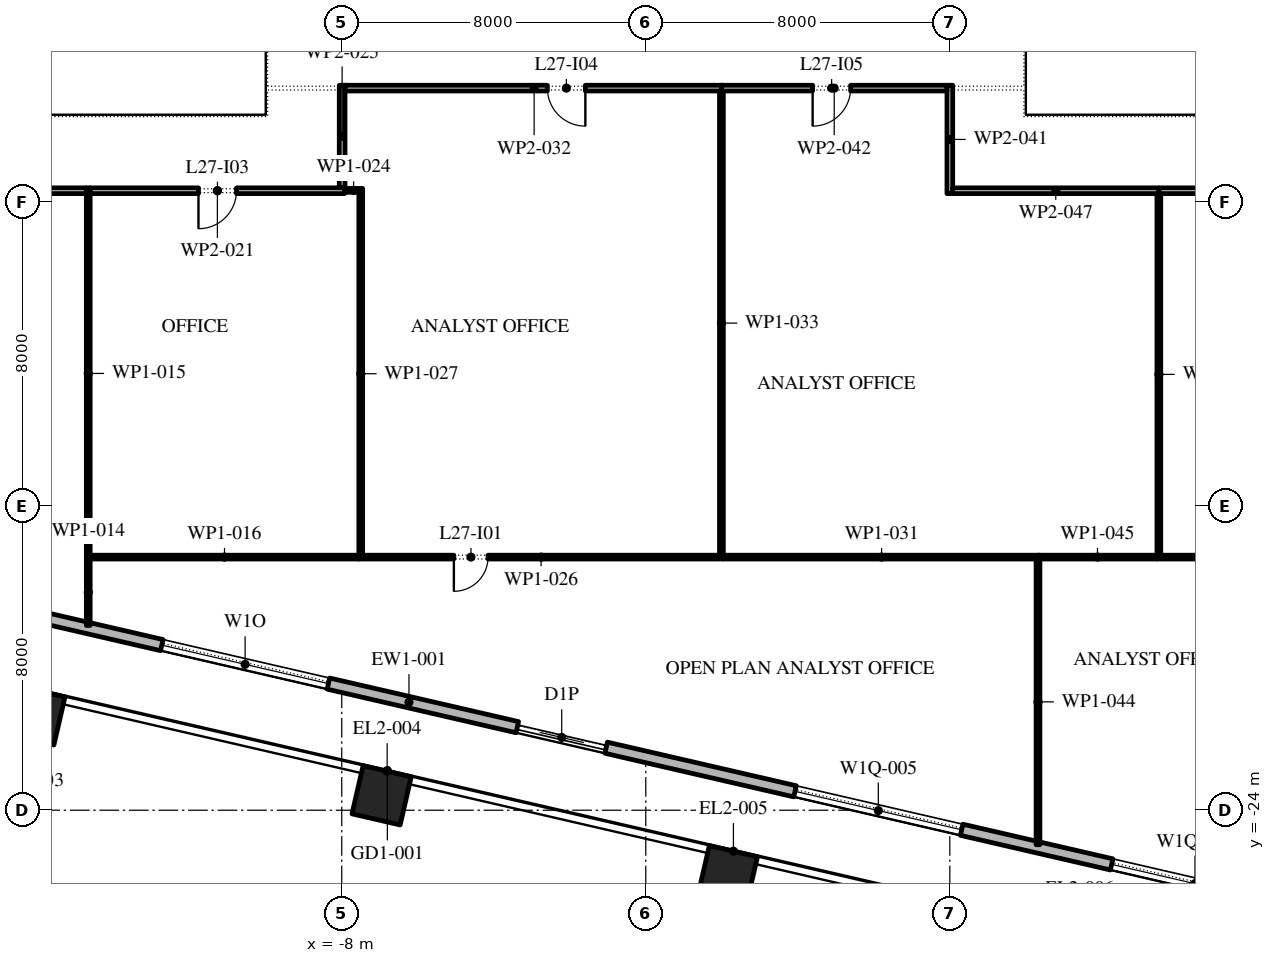
"""IFC4 building model, lengths in metres.
Left out: names, types, materials, properties, quantities, classifications, styles, units other than length and angle.
Written with IfcOpenShell. Run it as: python <this file> out.ifc"""

import sys

from ifc_helpers import new_model, si_unit, direction, frame, frame_2d, origin, origin_2d, place, context, subcontext, project, spatial, rectangle, extrude, element, fill, save


model = new_model("IFC4")
c1 = context("Model", 3, precision=1e-05, world=origin(), true_north=direction((0.0, 1.0)))
c2 = subcontext(c1, "Body", "Model", "MODEL_VIEW")
j1 = project(units=[si_unit("LENGTHUNIT", "METRE"), si_unit("PLANEANGLEUNIT", "RADIAN")], contexts=[c1])
p1 = place(None, origin())
s1 = spatial("IfcSite", under=j1, at=p1, CompositionType="ELEMENT")
p2 = place(p1, origin())
s2 = spatial("IfcBuilding", under=s1, at=p2, CompositionType="ELEMENT")
p3 = place(p2, frame((0.0, 0.0, 126.6)))
s3 = spatial("IfcBuildingStorey", under=s2, at=p3, CompositionType="ELEMENT", Elevation=126.6)
for number, where, z_axis, x_axis in (
    (1, (-16.061, -21.505, 0.0), (0.0, 0.0, 1.0), (0.974, -0.225, 0.0)),
    (2, (-6.951, -23.608, 0.0), (0.0, 0.0, 1.0), (0.974, -0.225, 0.0)),
    (3, (2.159, -25.711, 0.0), (0.0, 0.0, 1.0), (0.974, -0.225, 0.0)),
):
    element("IfcColumn", number, at=place(p3, frame(where, z_axis=z_axis, x_axis=x_axis)), inside=s3, PredefinedType="COLUMN", context=c2, shape_type="SweptSolid", body=[
        extrude(rectangle(XDim=1.3, YDim=1.3, at=origin_2d()), origin(), (0.0, 0.0, 1.0), 4.2),
    ])
p4 = place(p3, frame((-31.078, -15.421, 0.0), z_axis=(0.0, 0.0, 1.0), x_axis=(0.974370456532, -0.224949357493, 0.0)))
e4 = element("IfcWall", 4, at=p4, inside=s3, PredefinedType="STANDARD", context=c2, shape_type="SweptSolid", body=[
    extrude(rectangle(XDim=51.0, YDim=0.3, at=frame_2d((25.5, 0.0))), origin(), (0.0, 0.0, 1.0), 4.0),
])
p5 = place(p4, frame((1.875, 0.0, 0.45)))
e5 = element("IfcOpeningElement", 5, at=p5, cuts=e4, PredefinedType="OPENING", context=c2, shape_type="SweptSolid", body=[
    extrude(rectangle(XDim=4.5, YDim=2.65, at=frame_2d((2.25, 1.325))), frame((0.0, 0.16, 0.0), z_axis=(0.0, -1.0, 0.0), x_axis=(1.0, 0.0, 0.0)), (0.0, 0.0, 1.0), 0.32),
])
p6 = place(p4, frame((10.275, 0.0, 0.45)))
e6 = element("IfcOpeningElement", 6, at=p6, cuts=e4, PredefinedType="OPENING", context=c2, shape_type="SweptSolid", body=[
    extrude(rectangle(XDim=4.5, YDim=2.525, at=frame_2d((2.25, 1.262))), frame((0.0, 0.16, 0.0), z_axis=(0.0, -1.0, 0.0), x_axis=(1.0, 0.0, 0.0)), (0.0, 0.0, 1.0), 0.32),
])
p7 = place(p4, frame((18.825, 0.0, 0.45)))
e7 = element("IfcOpeningElement", 7, at=p7, cuts=e4, PredefinedType="OPENING", context=c2, shape_type="SweptSolid", body=[
    extrude(rectangle(XDim=4.5, YDim=2.5, at=frame_2d((2.25, 1.25))), frame((0.0, 0.16, 0.0), z_axis=(0.0, -1.0, 0.0), x_axis=(1.0, 0.0, 0.0)), (0.0, 0.0, 1.0), 0.32),
])
p8 = place(p4, frame((28.425, 0.0, 0.0)))
e8 = element("IfcOpeningElement", 8, at=p8, cuts=e4, PredefinedType="OPENING", context=c2, shape_type="SweptSolid", body=[
    extrude(rectangle(XDim=2.4, YDim=2.9, at=frame_2d((1.2, 1.45))), frame((0.0, 0.16, 0.0), z_axis=(0.0, -1.0, 0.0), x_axis=(1.0, 0.0, 0.0)), (0.0, 0.0, 1.0), 0.32),
])
p9 = place(p4, frame((35.925, 0.0, 0.45)))
e9 = element("IfcOpeningElement", 9, at=p9, cuts=e4, PredefinedType="OPENING", context=c2, shape_type="SweptSolid", body=[
    extrude(rectangle(XDim=4.5, YDim=2.45, at=frame_2d((2.25, 1.225))), frame((0.0, 0.16, 0.0), z_axis=(0.0, -1.0, 0.0), x_axis=(1.0, 0.0, 0.0)), (0.0, 0.0, 1.0), 0.32),
])
p10 = place(p4, frame((44.475, 0.0, 0.45)))
e10 = element("IfcOpeningElement", 10, at=p10, cuts=e4, PredefinedType="OPENING", context=c2, shape_type="SweptSolid", body=[
    extrude(rectangle(XDim=4.5, YDim=2.45, at=frame_2d((2.25, 1.225))), frame((0.0, 0.16, 0.0), z_axis=(0.0, -1.0, 0.0), x_axis=(1.0, 0.0, 0.0)), (0.0, 0.0, 1.0), 0.32),
])
p11 = place(p3, frame((-14.67, -19.138, 0.0), z_axis=(0.0, 0.0, 1.0), x_axis=(0.0, 1.0, 0.0)))
e11 = element("IfcWall", 11, at=p11, inside=s3, PredefinedType="PARTITIONING", context=c2, shape_type="SweptSolid", body=[
    extrude(rectangle(XDim=1.748, YDim=0.1, at=frame_2d((0.874, 0.0))), origin(), (0.0, 0.0, 1.0), 4.0),
])
p12 = place(p3, frame((-14.67, -17.39, 0.0), z_axis=(0.0, 0.0, 1.0), x_axis=(0.0, 1.0, 0.0)))
e12 = element("IfcWall", 12, at=p12, inside=s3, PredefinedType="PARTITIONING", context=c2, shape_type="SweptSolid", body=[
    extrude(rectangle(XDim=9.765, YDim=0.1, at=frame_2d((4.882, 0.0))), origin(), (0.0, 0.0, 1.0), 4.0),
])
p13 = place(p3, frame((-14.62, -17.34, 0.0), z_axis=(0.0, 0.0, 1.0), x_axis=(1.0, 0.0, 0.0)))
e13 = element("IfcWall", 13, at=p13, inside=s3, PredefinedType="PARTITIONING", context=c2, shape_type="SweptSolid", body=[
    extrude(rectangle(XDim=7.07, YDim=0.1, at=frame_2d((3.535, 0.0))), origin(), (0.0, 0.0, 1.0), 4.0),
])
p14 = place(p3, frame((-14.72, -7.7, 0.0), z_axis=(0.0, 0.0, 1.0), x_axis=(-1.0, 0.0, 0.0)))
e14 = element("IfcWall", 14, at=p14, inside=s3, PredefinedType="PARTITIONING", context=c2, shape_type="SweptSolid", body=[
    extrude(rectangle(XDim=8.24, YDim=0.15, at=frame_2d((4.12, 0.0))), origin(), (0.0, 0.0, 1.0), 4.0),
])
p15 = place(p14, frame((5.39, 0.0, 0.0)))
e15 = element("IfcOpeningElement", 15, at=p15, cuts=e14, PredefinedType="OPENING", context=c2, shape_type="SweptSolid", body=[
    extrude(rectangle(XDim=1.0, YDim=2.1, at=frame_2d((0.5, 1.05))), frame((0.0, 0.085, 0.0), z_axis=(0.0, -1.0, 0.0), x_axis=(1.0, 0.0, 0.0)), (0.0, 0.0, 1.0), 0.17),
])
p16 = place(p3, frame((-7.925, -7.7, 0.0), z_axis=(0.0, 0.0, 1.0), x_axis=(-1.0, 0.0, 0.0)))
e16 = element("IfcWall", 16, at=p16, inside=s3, PredefinedType="PARTITIONING", context=c2, shape_type="SweptSolid", body=[
    extrude(rectangle(XDim=6.695, YDim=0.15, at=frame_2d((3.348, 0.0))), origin(), (0.0, 0.0, 1.0), 4.0),
])
p17 = place(p16, frame((2.845, 0.0, 0.0)))
e17 = element("IfcOpeningElement", 17, at=p17, cuts=e16, PredefinedType="OPENING", context=c2, shape_type="SweptSolid", body=[
    extrude(rectangle(XDim=1.0, YDim=2.1, at=frame_2d((0.5, 1.05))), frame((0.0, 0.085, 0.0), z_axis=(0.0, -1.0, 0.0), x_axis=(1.0, 0.0, 0.0)), (0.0, 0.0, 1.0), 0.17),
])
p18 = place(p3, frame((-7.925, -7.69, 0.0), z_axis=(0.0, 0.0, 1.0), x_axis=(1.0, 0.0, 0.0)))
e18 = element("IfcWall", 18, at=p18, inside=s3, PredefinedType="PARTITIONING", context=c2, shape_type="SweptSolid", body=[
    extrude(rectangle(XDim=0.475, YDim=0.1, at=frame_2d((0.238, 0.0))), origin(), (0.0, 0.0, 1.0), 4.0),
])
p19 = place(p3, frame((-7.99, -4.925, 0.0), z_axis=(0.0, 0.0, 1.0), x_axis=(0.0, -1.0, 0.0)))
e19 = element("IfcWall", 19, at=p19, inside=s3, PredefinedType="PARTITIONING", context=c2, shape_type="SweptSolid", body=[
    extrude(rectangle(XDim=2.69, YDim=0.15, at=frame_2d((1.345, 0.0))), origin(), (0.0, 0.0, 1.0), 4.0),
])
p20 = place(p3, frame((-7.55, -17.34, 0.0), z_axis=(0.0, 0.0, 1.0), x_axis=(1.0, 0.0, 0.0)))
e20 = element("IfcWall", 20, at=p20, inside=s3, PredefinedType="PARTITIONING", context=c2, shape_type="SweptSolid", body=[
    extrude(rectangle(XDim=9.59, YDim=0.1, at=frame_2d((4.795, 0.0))), origin(), (0.0, 0.0, 1.0), 4.0),
])
p21 = place(p20, frame((2.5, 0.0, 0.0)))
e21 = element("IfcOpeningElement", 21, at=p21, cuts=e20, PredefinedType="OPENING", context=c2, shape_type="SweptSolid", body=[
    extrude(rectangle(XDim=0.9, YDim=2.1, at=frame_2d((0.45, 1.05))), frame((0.0, 0.06, 0.0), z_axis=(0.0, -1.0, 0.0), x_axis=(1.0, 0.0, 0.0)), (0.0, 0.0, 1.0), 0.12),
])
p22 = place(p3, frame((-7.5, -7.74, 0.0), z_axis=(0.0, 0.0, 1.0), x_axis=(0.0, -1.0, 0.0)))
e22 = element("IfcWall", 22, at=p22, inside=s3, PredefinedType="PARTITIONING", context=c2, shape_type="SweptSolid", body=[
    extrude(rectangle(XDim=9.55, YDim=0.1, at=frame_2d((4.775, 0.0))), origin(), (0.0, 0.0, 1.0), 4.0),
])
p23 = place(p3, frame((2.04, -17.34, 0.0), z_axis=(0.0, 0.0, 1.0), x_axis=(1.0, 0.0, 0.0)))
e23 = element("IfcWall", 23, at=p23, inside=s3, PredefinedType="PARTITIONING", context=c2, shape_type="SweptSolid", body=[
    extrude(rectangle(XDim=8.33, YDim=0.1, at=frame_2d((4.165, 0.0))), origin(), (0.0, 0.0, 1.0), 4.0),
])
p24 = place(p3, frame((2.04, -5.0, 0.0), z_axis=(0.0, 0.0, 1.0), x_axis=(-1.0, 0.0, 0.0)))
e24 = element("IfcWall", 24, at=p24, inside=s3, PredefinedType="PARTITIONING", context=c2, shape_type="SweptSolid", body=[
    extrude(rectangle(XDim=9.955, YDim=0.15, at=frame_2d((4.978, 0.0))), origin(), (0.0, 0.0, 1.0), 4.0),
])
p25 = place(p24, frame((3.63, 0.0, 0.0)))
e25 = element("IfcOpeningElement", 25, at=p25, cuts=e24, PredefinedType="OPENING", context=c2, shape_type="SweptSolid", body=[
    extrude(rectangle(XDim=1.0, YDim=2.1, at=frame_2d((0.5, 1.05))), frame((0.0, 0.085, 0.0), z_axis=(0.0, -1.0, 0.0), x_axis=(1.0, 0.0, 0.0)), (0.0, 0.0, 1.0), 0.17),
])
p26 = place(p3, frame((1.99, -5.075, 0.0), z_axis=(0.0, 0.0, 1.0), x_axis=(0.0, -1.0, 0.0)))
e26 = element("IfcWall", 26, at=p26, inside=s3, PredefinedType="PARTITIONING", context=c2, shape_type="SweptSolid", body=[
    extrude(rectangle(XDim=12.215, YDim=0.1, at=frame_2d((6.107, 0.0))), origin(), (0.0, 0.0, 1.0), 4.0),
])
p27 = place(p3, frame((8.0, -7.775, 0.0), z_axis=(0.0, 0.0, 1.0), x_axis=(0.0, 1.0, 0.0)))
e27 = element("IfcWall", 27, at=p27, inside=s3, PredefinedType="PARTITIONING", context=c2, shape_type="SweptSolid", body=[
    extrude(rectangle(XDim=2.85, YDim=0.15, at=frame_2d((1.425, 0.0))), origin(), (0.0, 0.0, 1.0), 4.0),
])
p28 = place(p3, frame((7.925, -5.0, 0.0), z_axis=(0.0, 0.0, 1.0), x_axis=(-1.0, 0.0, 0.0)))
e28 = element("IfcWall", 28, at=p28, inside=s3, PredefinedType="PARTITIONING", context=c2, shape_type="SweptSolid", body=[
    extrude(rectangle(XDim=5.935, YDim=0.15, at=frame_2d((2.968, 0.0))), origin(), (0.0, 0.0, 1.0), 4.0),
])
p29 = place(p28, frame((2.535, 0.0, 0.0)))
e29 = element("IfcOpeningElement", 29, at=p29, cuts=e28, PredefinedType="OPENING", context=c2, shape_type="SweptSolid", body=[
    extrude(rectangle(XDim=1.0, YDim=2.1, at=frame_2d((0.5, 1.05))), frame((0.0, 0.085, 0.0), z_axis=(0.0, -1.0, 0.0), x_axis=(1.0, 0.0, 0.0)), (0.0, 0.0, 1.0), 0.17),
])
p30 = place(p3, frame((10.32, -17.39, 0.0), z_axis=(0.0, 0.0, 1.0), x_axis=(0.0, -1.0, 0.0)))
e30 = element("IfcWall", 30, at=p30, inside=s3, PredefinedType="PARTITIONING", context=c2, shape_type="SweptSolid", body=[
    extrude(rectangle(XDim=7.517, YDim=0.1, at=frame_2d((3.759, 0.0))), origin(), (0.0, 0.0, 1.0), 4.0),
])
p31 = place(p3, frame((10.32, -17.34, 0.0), z_axis=(0.0, 0.0, 1.0), x_axis=(1.0, 0.0, 0.0)))
e31 = element("IfcWall", 31, at=p31, inside=s3, PredefinedType="PARTITIONING", context=c2, shape_type="SweptSolid", body=[
    extrude(rectangle(XDim=3.13, YDim=0.1, at=frame_2d((1.565, 0.0))), origin(), (0.0, 0.0, 1.0), 4.0),
])
p32 = place(p3, frame((13.45, -17.34, 0.0), z_axis=(0.0, 0.0, 1.0), x_axis=(1.0, 0.0, 0.0)))
e32 = element("IfcWall", 32, at=p32, inside=s3, PredefinedType="PARTITIONING", context=c2, shape_type="SweptSolid", body=[
    extrude(rectangle(XDim=10.1, YDim=0.1, at=frame_2d((5.05, 0.0))), origin(), (0.0, 0.0, 1.0), 4.0),
])
p33 = place(p32, frame((4.5, 0.0, 0.0)))
e33 = element("IfcOpeningElement", 33, at=p33, cuts=e32, PredefinedType="OPENING", context=c2, shape_type="SweptSolid", body=[
    extrude(rectangle(XDim=0.9, YDim=2.1, at=frame_2d((0.45, 1.05))), frame((0.0, 0.06, 0.0), z_axis=(0.0, -1.0, 0.0), x_axis=(1.0, 0.0, 0.0)), (0.0, 0.0, 1.0), 0.12),
])
p34 = place(p3, frame((13.5, -7.7, 0.0), z_axis=(0.0, 0.0, 1.0), x_axis=(-1.0, 0.0, 0.0)))
e34 = element("IfcWall", 34, at=p34, inside=s3, PredefinedType="PARTITIONING", context=c2, shape_type="SweptSolid", body=[
    extrude(rectangle(XDim=5.425, YDim=0.15, at=frame_2d((2.712, 0.0))), origin(), (0.0, 0.0, 1.0), 4.0),
])
p35 = place(p3, frame((13.5, -7.775, 0.0), z_axis=(0.0, 0.0, 1.0), x_axis=(0.0, -1.0, 0.0)))
e35 = element("IfcWall", 35, at=p35, inside=s3, PredefinedType="PARTITIONING", context=c2, shape_type="SweptSolid", body=[
    extrude(rectangle(XDim=9.515, YDim=0.1, at=frame_2d((4.758, 0.0))), origin(), (0.0, 0.0, 1.0), 4.0),
])
p36 = place(p3, frame((23.55, -7.7, 0.0), z_axis=(0.0, 0.0, 1.0), x_axis=(-1.0, 0.0, 0.0)))
e36 = element("IfcWall", 36, at=p36, inside=s3, PredefinedType="PARTITIONING", context=c2, shape_type="SweptSolid", body=[
    extrude(rectangle(XDim=10.05, YDim=0.15, at=frame_2d((5.025, 0.0))), origin(), (0.0, 0.0, 1.0), 4.0),
])
p37 = place(p36, frame((2.65, 0.0, 0.0)))
e37 = element("IfcOpeningElement", 37, at=p37, cuts=e36, PredefinedType="OPENING", context=c2, shape_type="SweptSolid", body=[
    extrude(rectangle(XDim=1.0, YDim=2.1, at=frame_2d((0.5, 1.05))), frame((0.0, 0.085, 0.0), z_axis=(0.0, -1.0, 0.0), x_axis=(1.0, 0.0, 0.0)), (0.0, 0.0, 1.0), 0.17),
])
p38 = place(p7, origin())
e38 = element("IfcWindow", 38, at=p38, inside=s3, PartitioningType="DOUBLE_PANEL_VERTICAL", PredefinedType="WINDOW", context=c2, shape_type="SweptSolid", body=[
    extrude(rectangle(XDim=4.5, YDim=2.5, at=frame_2d((2.25, 1.25))), frame((0.0, 0.03, 0.0), z_axis=(0.0, -1.0, 0.0), x_axis=(1.0, 0.0, 0.0)), (0.0, 0.0, 1.0), 0.06),
])
fill(e7, e38)
p39 = place(p8, origin())
e39 = element("IfcDoor", 39, at=p39, inside=s3, OperationType="DOUBLE_DOOR_SLIDING", PredefinedType="DOOR", context=c2, shape_type="SweptSolid", body=[
    extrude(rectangle(XDim=2.4, YDim=2.9, at=frame_2d((1.2, 1.45))), frame((0.0, 0.025, 0.0), z_axis=(0.0, -1.0, 0.0), x_axis=(1.0, 0.0, 0.0)), (0.0, 0.0, 1.0), 0.05),
])
fill(e8, e39)
p40 = place(p9, origin())
e40 = element("IfcWindow", 40, at=p40, inside=s3, PartitioningType="DOUBLE_PANEL_VERTICAL", PredefinedType="WINDOW", context=c2, shape_type="SweptSolid", body=[
    extrude(rectangle(XDim=4.5, YDim=2.45, at=frame_2d((2.25, 1.225))), frame((0.0, 0.03, 0.0), z_axis=(0.0, -1.0, 0.0), x_axis=(1.0, 0.0, 0.0)), (0.0, 0.0, 1.0), 0.06),
])
fill(e9, e40)
p41 = place(p10, origin())
e41 = element("IfcWindow", 41, at=p41, inside=s3, PartitioningType="DOUBLE_PANEL_VERTICAL", PredefinedType="WINDOW", context=c2, shape_type="SweptSolid", body=[
    extrude(rectangle(XDim=4.5, YDim=2.45, at=frame_2d((2.25, 1.225))), frame((0.0, 0.03, 0.0), z_axis=(0.0, -1.0, 0.0), x_axis=(1.0, 0.0, 0.0)), (0.0, 0.0, 1.0), 0.06),
])
fill(e10, e41)
p42 = place(p21, frame((0.9, 0.0, 0.0), z_axis=(0.0, 0.0, 1.0), x_axis=(-1.0, 0.0, 0.0)))
e42 = element("IfcDoor", 42, at=p42, inside=s3, OperationType="SINGLE_SWING_LEFT", PredefinedType="DOOR", context=c2, shape_type="SweptSolid", body=[
    extrude(rectangle(XDim=0.9, YDim=2.1, at=frame_2d((0.45, 1.05))), frame((0.0, 0.025, 0.0), z_axis=(0.0, -1.0, 0.0), x_axis=(1.0, 0.0, 0.0)), (0.0, 0.0, 1.0), 0.05),
])
fill(e21, e42)
p43 = place(p17, origin())
e43 = element("IfcDoor", 43, at=p43, inside=s3, OperationType="SINGLE_SWING_LEFT", PredefinedType="DOOR", context=c2, shape_type="SweptSolid", body=[
    extrude(rectangle(XDim=1.0, YDim=2.1, at=frame_2d((0.5, 1.05))), frame((0.0, 0.025, 0.0), z_axis=(0.0, -1.0, 0.0), x_axis=(1.0, 0.0, 0.0)), (0.0, 0.0, 1.0), 0.05),
])
fill(e17, e43)
p44 = place(p25, origin())
e44 = element("IfcDoor", 44, at=p44, inside=s3, OperationType="SINGLE_SWING_RIGHT", PredefinedType="DOOR", context=c2, shape_type="SweptSolid", body=[
    extrude(rectangle(XDim=1.0, YDim=2.1, at=frame_2d((0.5, 1.05))), frame((0.0, 0.025, 0.0), z_axis=(0.0, -1.0, 0.0), x_axis=(1.0, 0.0, 0.0)), (0.0, 0.0, 1.0), 0.05),
])
fill(e25, e44)
p45 = place(p29, origin())
e45 = element("IfcDoor", 45, at=p45, inside=s3, OperationType="SINGLE_SWING_LEFT", PredefinedType="DOOR", context=c2, shape_type="SweptSolid", body=[
    extrude(rectangle(XDim=1.0, YDim=2.1, at=frame_2d((0.5, 1.05))), frame((0.0, 0.025, 0.0), z_axis=(0.0, -1.0, 0.0), x_axis=(1.0, 0.0, 0.0)), (0.0, 0.0, 1.0), 0.05),
])
fill(e29, e45)
save(model, sys.argv[1])
